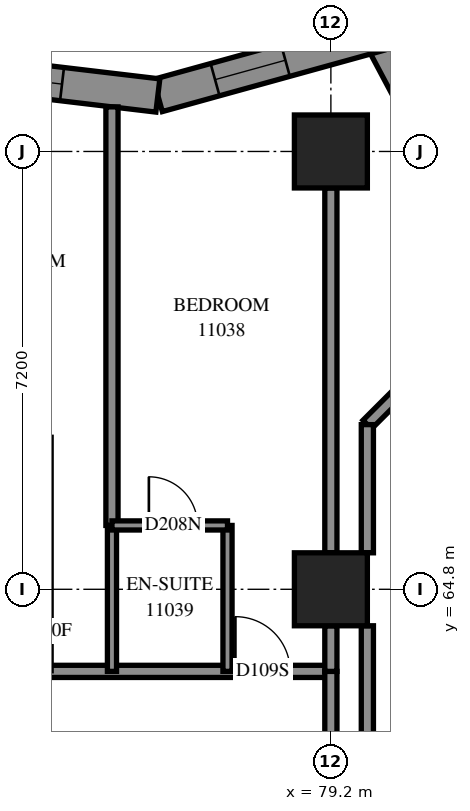
"""IFC4 building model, lengths in metres.
Left out: names, types, materials, properties, quantities, classifications, styles, units other than length and angle.
Written with IfcOpenShell. Run it as: python <this file> out.ifc"""

import sys

from ifc_helpers import new_model, si_unit, direction, frame, frame_2d, origin, origin_2d, place, context, subcontext, project, spatial, polyline, rectangle, outline, extrude, element, fill, save


model = new_model("IFC4")
c1 = context("Model", 3, precision=1e-05, world=origin(), true_north=direction((0.0, 1.0)))
c2 = subcontext(c1, "Body", "Model", "MODEL_VIEW")
j1 = project(units=[si_unit("LENGTHUNIT", "METRE"), si_unit("PLANEANGLEUNIT", "RADIAN")], contexts=[c1])
p1 = place(None, origin())
s1 = spatial("IfcSite", under=j1, at=p1, CompositionType="ELEMENT")
p2 = place(p1, origin())
s2 = spatial("IfcBuilding", under=s1, at=p2, CompositionType="ELEMENT")
p3 = place(p2, frame((0.0, 0.0, 44.0)))
s3 = spatial("IfcBuildingStorey", under=s2, at=p3, CompositionType="ELEMENT", Elevation=44.0)
for number, where, z_axis, x_axis in (
    (1, (79.2, 64.8, 0.0), (0.0, 0.0, 1.0), (1.0, 0.0, 0.0)),
    (2, (79.2, 72.0, 0.0), (0.0, 0.0, 1.0), (1.0, 0.0, 0.0)),
):
    element("IfcColumn", number, at=place(p3, frame(where, z_axis=z_axis, x_axis=x_axis)), inside=s3, PredefinedType="COLUMN", context=c2, shape_type="SweptSolid", body=[
        extrude(rectangle(XDim=1.2, YDim=1.2, at=origin_2d()), origin(), (0.0, 0.0, 1.0), 3.1),
    ])
p4 = place(p3, frame((81.602, 70.898, 0.0), z_axis=(0.0, 0.0, 1.0), x_axis=(-0.4691559366, 0.8831153419, 0.0)))
e3 = element("IfcWall", 3, at=p4, inside=s3, PredefinedType="SOLIDWALL", context=c2, shape_type="SweptSolid", body=[
    extrude(outline(polyline([(0.06, -0.275), (3.65, -0.275), (3.209, 0.275), (-0.06, 0.275), (0.06, -0.275)])), origin(), (0.0, 0.0, 1.0), 3.1),
])
p5 = place(p4, frame((0.795, 0.0, 0.5)))
e4 = element("IfcOpeningElement", 4, at=p5, cuts=e3, PredefinedType="OPENING", context=c2, shape_type="SweptSolid", body=[
    extrude(rectangle(XDim=1.2, YDim=2.45, at=frame_2d((0.6, 1.225))), frame((0.0, 0.285, 0.0), z_axis=(0.0, -1.0, 0.0), x_axis=(1.0, 0.0, 0.0)), (0.0, 0.0, 1.0), 0.57),
])
p6 = place(p3, frame((79.993, 73.927, 0.0), z_axis=(0.0, 0.0, 1.0), x_axis=(-0.9637951892, -0.2666436448, 0.0)))
e5 = element("IfcWall", 5, at=p6, inside=s3, PredefinedType="SOLIDWALL", context=c2, shape_type="SweptSolid", body=[
    extrude(outline(polyline([(-0.221, -0.275), (3.721, -0.275), (3.829, 0.275), (0.221, 0.275), (-0.221, -0.275)])), origin(), (0.0, 0.0, 1.0), 3.1),
])
p7 = place(p6, frame((1.599, 0.0, 0.5)))
e6 = element("IfcOpeningElement", 6, at=p7, cuts=e5, PredefinedType="OPENING", context=c2, shape_type="SweptSolid", body=[
    extrude(rectangle(XDim=1.2, YDim=2.45, at=frame_2d((0.6, 1.225))), frame((0.0, 0.285, 0.0), z_axis=(0.0, -1.0, 0.0), x_axis=(1.0, 0.0, 0.0)), (0.0, 0.0, 1.0), 0.57),
])
p8 = place(p3, frame((76.355, 72.921, 0.0), z_axis=(0.0, 0.0, 1.0), x_axis=(-0.9930244072, 0.1179089763, 0.0)))
e7 = element("IfcWall", 7, at=p8, inside=s3, PredefinedType="SOLIDWALL", context=c2, shape_type="SweptSolid", body=[
    extrude(outline(polyline([(0.054, -0.275), (3.88, -0.275), (3.814, 0.275), (-0.054, 0.275), (0.054, -0.275)])), origin(), (0.0, 0.0, 1.0), 3.1),
])
p9 = place(p8, frame((1.587, 0.0, 0.5)))
e8 = element("IfcOpeningElement", 8, at=p9, cuts=e7, PredefinedType="OPENING", context=c2, shape_type="SweptSolid", body=[
    extrude(rectangle(XDim=1.2, YDim=2.45, at=frame_2d((0.6, 1.225))), frame((0.0, 0.285, 0.0), z_axis=(0.0, -1.0, 0.0), x_axis=(1.0, 0.0, 0.0)), (0.0, 0.0, 1.0), 0.57),
])
p10 = place(p3, frame((79.871, 55.843, 0.0), z_axis=(0.0, 0.0, 1.0), x_axis=(0.7071067812, 0.7071067812, 0.0)))
e9 = element("IfcWall", 9, at=p10, inside=s3, PredefinedType="PARTITIONING", context=c2, shape_type="SweptSolid", body=[
    extrude(rectangle(XDim=9.85, YDim=0.2, at=frame_2d((4.925, 0.0))), origin(), (0.0, 0.0, 1.0), 3.1),
])
p11 = place(p10, frame((1.135, 0.0, 0.0)))
e10 = element("IfcOpeningElement", 10, at=p11, cuts=e9, PredefinedType="OPENING", context=c2, shape_type="SweptSolid", body=[
    extrude(rectangle(XDim=1.0, YDim=2.1, at=frame_2d((0.5, 1.05))), frame((0.0, 0.11, 0.0), z_axis=(0.0, -1.0, 0.0), x_axis=(1.0, 0.0, 0.0)), (0.0, 0.0, 1.0), 0.22),
])
p12 = place(p3, frame((75.6, 65.85, 0.0), z_axis=(0.0, 0.0, 1.0), x_axis=(0.0, 1.0, 0.0)))
e11 = element("IfcWall", 11, at=p12, inside=s3, PredefinedType="PARTITIONING", context=c2, shape_type="SweptSolid", body=[
    extrude(rectangle(XDim=6.883, YDim=0.2, at=frame_2d((3.442, 0.0))), origin(), (0.0, 0.0, 1.0), 3.1),
])
for number, where, z_axis, x_axis in (
    (12, (79.2, 65.4, 0.0), (0.0, 0.0, 1.0), (0.0, 1.0, 0.0)),
    (13, (79.8, 58.2, 0.0), (0.0, 0.0, 1.0), (0.0, 1.0, 0.0)),
):
    element("IfcWall", number, at=place(p3, frame(where, z_axis=z_axis, x_axis=x_axis)), inside=s3, PredefinedType="PARTITIONING", context=c2, shape_type="SweptSolid", body=[
        extrude(rectangle(XDim=6.0, YDim=0.2, at=frame_2d((3.0, 0.0))), origin(), (0.0, 0.0, 1.0), 3.1),
    ])
p13 = place(p3, frame((74.51, 63.45, 0.0), z_axis=(0.0, 0.0, 1.0), x_axis=(1.0, 0.0, 0.0)))
e14 = element("IfcWall", 14, at=p13, inside=s3, PredefinedType="PARTITIONING", context=c2, shape_type="SweptSolid", body=[
    extrude(rectangle(XDim=4.69, YDim=0.2, at=frame_2d((2.345, 0.0))), origin(), (0.0, 0.0, 1.0), 3.1),
])
p14 = place(p13, frame((3.12, 0.0, 0.0)))
e15 = element("IfcOpeningElement", 15, at=p14, cuts=e14, PredefinedType="OPENING", context=c2, shape_type="SweptSolid", body=[
    extrude(rectangle(XDim=0.9, YDim=2.1, at=frame_2d((0.45, 1.05))), frame((0.0, 0.11, 0.0), z_axis=(0.0, -1.0, 0.0), x_axis=(1.0, 0.0, 0.0)), (0.0, 0.0, 1.0), 0.22),
])
p15 = place(p3, frame((79.799, 67.509, 0.0), z_axis=(0.0, 0.0, 1.0), x_axis=(0.7070926629, 0.7071208992, 0.0)))
e16 = element("IfcWall", 16, at=p15, inside=s3, PredefinedType="PARTITIONING", context=c2, shape_type="SweptSolid", body=[
    extrude(rectangle(XDim=3.542, YDim=0.2, at=frame_2d((1.771, 0.0))), origin(), (0.0, 0.0, 1.0), 3.1),
])
for number, where, z_axis, x_axis in (
    (17, (75.6, 63.45, 0.0), (0.0, 0.0, 1.0), (0.0, 1.0, 0.0)),
    (18, (77.5, 63.45, 0.0), (0.0, 0.0, 1.0), (0.0, 1.0, 0.0)),
):
    element("IfcWall", number, at=place(p3, frame(where, z_axis=z_axis, x_axis=x_axis)), inside=s3, PredefinedType="PARTITIONING", context=c2, shape_type="SweptSolid", body=[
        extrude(rectangle(XDim=2.4, YDim=0.15, at=frame_2d((1.2, 0.0))), origin(), (0.0, 0.0, 1.0), 3.1),
    ])
p16 = place(p3, frame((79.8, 65.4, 0.0), z_axis=(0.0, 0.0, 1.0), x_axis=(0.0, 1.0, 0.0)))
e19 = element("IfcWall", 19, at=p16, inside=s3, PredefinedType="PARTITIONING", context=c2, shape_type="SweptSolid", body=[
    extrude(rectangle(XDim=2.108, YDim=0.2, at=frame_2d((1.054, 0.0))), origin(), (0.0, 0.0, 1.0), 3.1),
])
p17 = place(p3, frame((79.2, 61.35, 0.0), z_axis=(0.0, 0.0, 1.0), x_axis=(0.0, 1.0, 0.0)))
e20 = element("IfcWall", 20, at=p17, inside=s3, PredefinedType="PARTITIONING", context=c2, shape_type="SweptSolid", body=[
    extrude(rectangle(XDim=2.1, YDim=0.2, at=frame_2d((1.05, 0.0))), origin(), (0.0, 0.0, 1.0), 3.1),
])
p18 = place(p3, frame((75.6, 65.85, 0.0), z_axis=(0.0, 0.0, 1.0), x_axis=(1.0, 0.0, 0.0)))
e21 = element("IfcWall", 21, at=p18, inside=s3, PredefinedType="PARTITIONING", context=c2, shape_type="SweptSolid", body=[
    extrude(rectangle(XDim=1.9, YDim=0.15, at=frame_2d((0.95, 0.0))), origin(), (0.0, 0.0, 1.0), 3.1),
])
p19 = place(p18, frame((0.607, 0.0, 0.0)))
e22 = element("IfcOpeningElement", 22, at=p19, cuts=e21, PredefinedType="OPENING", context=c2, shape_type="SweptSolid", body=[
    extrude(rectangle(XDim=0.8, YDim=2.1, at=frame_2d((0.4, 1.05))), frame((0.0, 0.085, 0.0), z_axis=(0.0, -1.0, 0.0), x_axis=(1.0, 0.0, 0.0)), (0.0, 0.0, 1.0), 0.17),
])
p20 = place(p3, frame((79.2, 63.45, 0.0), z_axis=(0.0, 0.0, 1.0), x_axis=(0.0, 1.0, 0.0)))
e23 = element("IfcWall", 23, at=p20, inside=s3, PredefinedType="PARTITIONING", context=c2, shape_type="SweptSolid", body=[
    extrude(rectangle(XDim=0.75, YDim=0.2, at=frame_2d((0.375, 0.0))), origin(), (0.0, 0.0, 1.0), 3.1),
])
p21 = place(p7, origin())
e24 = element("IfcWindow", 24, at=p21, inside=s3, PartitioningType="SINGLE_PANEL", PredefinedType="WINDOW", context=c2, shape_type="SweptSolid", body=[
    extrude(rectangle(XDim=1.2, YDim=2.45, at=frame_2d((0.6, 1.225))), frame((0.0, 0.155, 0.0), z_axis=(0.0, -1.0, 0.0), x_axis=(1.0, 0.0, 0.0)), (0.0, 0.0, 1.0), 0.06),
])
fill(e6, e24)
p22 = place(p9, origin())
e25 = element("IfcWindow", 25, at=p22, inside=s3, PartitioningType="SINGLE_PANEL", PredefinedType="WINDOW", context=c2, shape_type="SweptSolid", body=[
    extrude(rectangle(XDim=1.2, YDim=2.45, at=frame_2d((0.6, 1.225))), frame((0.0, 0.155, 0.0), z_axis=(0.0, -1.0, 0.0), x_axis=(1.0, 0.0, 0.0)), (0.0, 0.0, 1.0), 0.06),
])
fill(e8, e25)
p23 = place(p14, origin())
e26 = element("IfcDoor", 26, at=p23, inside=s3, OperationType="SINGLE_SWING_LEFT", PredefinedType="DOOR", context=c2, shape_type="SweptSolid", body=[
    extrude(rectangle(XDim=0.9, YDim=2.1, at=frame_2d((0.45, 1.05))), frame((0.0, 0.025, 0.0), z_axis=(0.0, -1.0, 0.0), x_axis=(1.0, 0.0, 0.0)), (0.0, 0.0, 1.0), 0.05),
])
fill(e15, e26)
p24 = place(p19, origin())
e27 = element("IfcDoor", 27, at=p24, inside=s3, OperationType="SINGLE_SWING_RIGHT", PredefinedType="DOOR", context=c2, shape_type="SweptSolid", body=[
    extrude(rectangle(XDim=0.8, YDim=2.1, at=frame_2d((0.4, 1.05))), frame((0.0, 0.025, 0.0), z_axis=(0.0, -1.0, 0.0), x_axis=(1.0, 0.0, 0.0)), (0.0, 0.0, 1.0), 0.05),
])
fill(e22, e27)
save(model, sys.argv[1])
